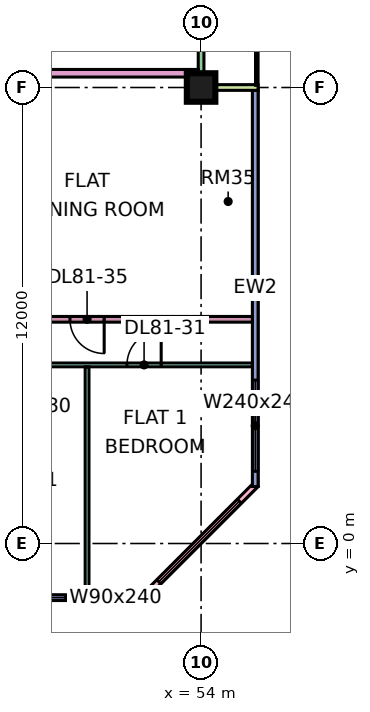
"""IFC4 building model, lengths in metres.
Left out: names, types, materials, properties, quantities, classifications, styles, units other than length and angle.
Written with IfcOpenShell. Run it as: python <this file> out.ifc"""

import sys

from ifc_helpers import new_model, si_unit, direction, frame, frame_2d, origin, origin_2d, place, context, subcontext, project, spatial, rectangle, extrude, element, fill, save


model = new_model("IFC4")
c1 = context("Model", 3, precision=1e-05, world=origin(), true_north=direction((0.0, 1.0)))
c2 = subcontext(c1, "Body", "Model", "MODEL_VIEW")
j1 = project(units=[si_unit("LENGTHUNIT", "METRE"), si_unit("PLANEANGLEUNIT", "RADIAN")], contexts=[c1])
p1 = place(None, origin())
s1 = spatial("IfcSite", under=j1, at=p1, CompositionType="ELEMENT")
p2 = place(p1, origin())
s2 = spatial("IfcBuilding", under=s1, at=p2, CompositionType="ELEMENT")
p3 = place(p2, frame((0.0, 0.0, 350.15)))
s3 = spatial("IfcBuildingStorey", under=s2, at=p3, CompositionType="ELEMENT", Elevation=350.15)
p4 = place(p3, frame((54.0, 12.0, 0.0), z_axis=(0.0, 0.0, 1.0), x_axis=(1.0, 0.0, 0.0)))
e1 = element("IfcColumn", 1, at=p4, inside=s3, PredefinedType="COLUMN", context=c2, shape_type="SweptSolid", body=[
    extrude(rectangle(XDim=0.75, YDim=0.75, at=origin_2d()), origin(), (0.0, 0.0, 1.0), 3.75),
])
p5 = place(p3, frame((48.075, -1.425, 0.0), z_axis=(0.0, 0.0, 1.0), x_axis=(1.0, 0.0, 0.0)))
e2 = element("IfcWall", 2, at=p5, inside=s3, PredefinedType="SOLIDWALL", context=c2, shape_type="SweptSolid", body=[
    extrude(rectangle(XDim=4.425, YDim=0.15, at=frame_2d((2.212, 0.0))), origin(), (0.0, 0.0, 1.0), 3.35),
])
p6 = place(p5, frame((0.562, 0.0, 0.45)))
e3 = element("IfcOpeningElement", 3, at=p6, cuts=e2, PredefinedType="OPENING", context=c2, shape_type="SweptSolid", body=[
    extrude(rectangle(XDim=1.8, YDim=2.4, at=frame_2d((0.9, 1.2))), frame((0.0, 0.085, 0.0), z_axis=(0.0, -1.0, 0.0), x_axis=(1.0, 0.0, 0.0)), (0.0, 0.0, 1.0), 0.17),
])
p7 = place(p5, frame((3.225, 0.0, 0.45)))
e4 = element("IfcOpeningElement", 4, at=p7, cuts=e2, PredefinedType="OPENING", context=c2, shape_type="SweptSolid", body=[
    extrude(rectangle(XDim=0.9, YDim=2.4, at=frame_2d((0.45, 1.2))), frame((0.0, 0.085, 0.0), z_axis=(0.0, -1.0, 0.0), x_axis=(1.0, 0.0, 0.0)), (0.0, 0.0, 1.0), 0.17),
])
p8 = place(p3, frame((52.447, -1.447, 0.0), z_axis=(0.0, 0.0, 1.0), x_axis=(0.707106781187, 0.707106781187, 0.0)))
e5 = element("IfcWall", 5, at=p8, inside=s3, PredefinedType="SOLIDWALL", context=c2, shape_type="SweptSolid", body=[
    extrude(rectangle(XDim=4.243, YDim=0.15, at=frame_2d((2.121, 0.0))), origin(), (0.0, 0.0, 1.0), 3.35),
])
p9 = place(p8, frame((0.621, 0.0, 0.45)))
e6 = element("IfcOpeningElement", 6, at=p9, cuts=e5, PredefinedType="OPENING", context=c2, shape_type="SweptSolid", body=[
    extrude(rectangle(XDim=3.0, YDim=2.4, at=frame_2d((1.5, 1.2))), frame((0.0, 0.085, 0.0), z_axis=(0.0, -1.0, 0.0), x_axis=(1.0, 0.0, 0.0)), (0.0, 0.0, 1.0), 0.17),
])
p10 = place(p3, frame((55.425, 1.5, 0.0), z_axis=(0.0, 0.0, 1.0), x_axis=(0.0, 1.0, 0.0)))
e7 = element("IfcWall", 7, at=p10, inside=s3, PredefinedType="SOLIDWALL", context=c2, shape_type="SweptSolid", body=[
    extrude(rectangle(XDim=10.425, YDim=0.15, at=frame_2d((5.212, 0.0))), origin(), (0.0, 0.0, 1.0), 3.35),
])
p11 = place(p10, frame((0.4, 0.0, 0.45)))
e8 = element("IfcOpeningElement", 8, at=p11, cuts=e7, PredefinedType="OPENING", context=c2, shape_type="SweptSolid", body=[
    extrude(rectangle(XDim=2.4, YDim=2.4, at=frame_2d((1.2, 1.2))), frame((0.0, 0.085, 0.0), z_axis=(0.0, -1.0, 0.0), x_axis=(1.0, 0.0, 0.0)), (0.0, 0.0, 1.0), 0.17),
])
p12 = place(p3, frame((54.0, 12.075, 0.0), z_axis=(0.0, 0.0, 1.0), x_axis=(0.0, 1.0, 0.0)))
e9 = element("IfcWall", 9, at=p12, inside=s3, PredefinedType="SOLIDWALL", context=c2, shape_type="SweptSolid", body=[
    extrude(rectangle(XDim=10.35, YDim=0.15, at=frame_2d((5.175, 0.0))), origin(), (0.0, 0.0, 1.0), 3.35),
])
p13 = place(p12, frame((4.538, 0.0, 0.45)))
e10 = element("IfcOpeningElement", 10, at=p13, cuts=e9, PredefinedType="OPENING", context=c2, shape_type="SweptSolid", body=[
    extrude(rectangle(XDim=4.8, YDim=2.4, at=frame_2d((2.4, 1.2))), frame((0.0, 0.085, 0.0), z_axis=(0.0, -1.0, 0.0), x_axis=(1.0, 0.0, 0.0)), (0.0, 0.0, 1.0), 0.17),
])
p14 = place(p3, frame((55.5, 12.0, 0.0), z_axis=(0.0, 0.0, 1.0), x_axis=(-1.0, 0.0, 0.0)))
e11 = element("IfcWall", 11, at=p14, inside=s3, PredefinedType="SOLIDWALL", context=c2, shape_type="SweptSolid", body=[
    extrude(rectangle(XDim=1.5, YDim=0.15, at=frame_2d((0.75, 0.0))), origin(), (0.0, 0.0, 1.0), 3.35),
])
p15 = place(p3, frame((33.05, 4.7, 0.0), z_axis=(0.0, 0.0, 1.0), x_axis=(1.0, 0.0, 0.0)))
e12 = element("IfcWall", 12, at=p15, inside=s3, PredefinedType="PARTITIONING", context=c2, shape_type="SweptSolid", body=[
    extrude(rectangle(XDim=22.301, YDim=0.1, at=frame_2d((11.15, 0.0))), origin(), (0.0, 0.0, 1.0), 3.35),
])
p16 = place(p15, frame((1.0, 0.0, 0.0)))
e13 = element("IfcOpeningElement", 13, at=p16, cuts=e12, PredefinedType="OPENING", context=c2, shape_type="SweptSolid", body=[
    extrude(rectangle(XDim=0.9, YDim=2.1, at=frame_2d((0.45, 1.05))), frame((0.0, 0.06, 0.0), z_axis=(0.0, -1.0, 0.0), x_axis=(1.0, 0.0, 0.0)), (0.0, 0.0, 1.0), 0.12),
])
p17 = place(p15, frame((13.0, 0.0, 0.0)))
e14 = element("IfcOpeningElement", 14, at=p17, cuts=e12, PredefinedType="OPENING", context=c2, shape_type="SweptSolid", body=[
    extrude(rectangle(XDim=0.9, YDim=2.1, at=frame_2d((0.45, 1.05))), frame((0.0, 0.06, 0.0), z_axis=(0.0, -1.0, 0.0), x_axis=(1.0, 0.0, 0.0)), (0.0, 0.0, 1.0), 0.12),
])
p18 = place(p15, frame((16.0, 0.0, 0.0)))
e15 = element("IfcOpeningElement", 15, at=p18, cuts=e12, PredefinedType="OPENING", context=c2, shape_type="SweptSolid", body=[
    extrude(rectangle(XDim=0.9, YDim=2.1, at=frame_2d((0.45, 1.05))), frame((0.0, 0.06, 0.0), z_axis=(0.0, -1.0, 0.0), x_axis=(1.0, 0.0, 0.0)), (0.0, 0.0, 1.0), 0.12),
])
p19 = place(p15, frame((19.0, 0.0, 0.0)))
e16 = element("IfcOpeningElement", 16, at=p19, cuts=e12, PredefinedType="OPENING", context=c2, shape_type="SweptSolid", body=[
    extrude(rectangle(XDim=0.9, YDim=2.1, at=frame_2d((0.45, 1.05))), frame((0.0, 0.06, 0.0), z_axis=(0.0, -1.0, 0.0), x_axis=(1.0, 0.0, 0.0)), (0.0, 0.0, 1.0), 0.12),
])
p20 = place(p15, frame((7.0, 0.0, 0.0)))
e17 = element("IfcOpeningElement", 17, at=p20, cuts=e12, PredefinedType="OPENING", context=c2, shape_type="SweptSolid", body=[
    extrude(rectangle(XDim=0.9, YDim=2.1, at=frame_2d((0.45, 1.05))), frame((0.0, 0.06, 0.0), z_axis=(0.0, -1.0, 0.0), x_axis=(1.0, 0.0, 0.0)), (0.0, 0.0, 1.0), 0.12),
])
p21 = place(p3, frame((40.65, 12.375, 0.0), z_axis=(0.0, 0.0, 1.0), x_axis=(1.0, 0.0, 0.0)))
e18 = element("IfcWall", 18, at=p21, inside=s3, PredefinedType="PARTITIONING", context=c2, shape_type="SweptSolid", body=[
    extrude(rectangle(XDim=13.276, YDim=0.2, at=frame_2d((6.638, 0.0))), origin(), (0.0, 0.0, 1.0), 3.35),
])
p22 = place(p21, frame((1.05, 0.0, 0.0)))
e19 = element("IfcOpeningElement", 19, at=p22, cuts=e18, PredefinedType="OPENING", context=c2, shape_type="SweptSolid", body=[
    extrude(rectangle(XDim=1.0, YDim=2.1, at=frame_2d((0.5, 1.05))), frame((0.0, 0.11, 0.0), z_axis=(0.0, -1.0, 0.0), x_axis=(1.0, 0.0, 0.0)), (0.0, 0.0, 1.0), 0.22),
])
p23 = place(p3, frame((43.575, 5.9, 0.0), z_axis=(0.0, 0.0, 1.0), x_axis=(1.0, 0.0, 0.0)))
e20 = element("IfcWall", 20, at=p23, inside=s3, PredefinedType="PARTITIONING", context=c2, shape_type="SweptSolid", body=[
    extrude(rectangle(XDim=11.775, YDim=0.15, at=frame_2d((5.888, 0.0))), origin(), (0.0, 0.0, 1.0), 3.35),
])
p24 = place(p23, frame((1.825, 0.0, 0.0)))
e21 = element("IfcOpeningElement", 21, at=p24, cuts=e20, PredefinedType="OPENING", context=c2, shape_type="SweptSolid", body=[
    extrude(rectangle(XDim=0.8, YDim=2.1, at=frame_2d((0.4, 1.05))), frame((0.0, 0.085, 0.0), z_axis=(0.0, -1.0, 0.0), x_axis=(1.0, 0.0, 0.0)), (0.0, 0.0, 1.0), 0.17),
])
p25 = place(p23, frame((6.975, 0.0, 0.0)))
e22 = element("IfcOpeningElement", 22, at=p25, cuts=e20, PredefinedType="OPENING", context=c2, shape_type="SweptSolid", body=[
    extrude(rectangle(XDim=0.9, YDim=2.1, at=frame_2d((0.45, 1.05))), frame((0.0, 0.085, 0.0), z_axis=(0.0, -1.0, 0.0), x_axis=(1.0, 0.0, 0.0)), (0.0, 0.0, 1.0), 0.17),
])
p26 = place(p3, frame((51.0, -1.351, 0.0), z_axis=(0.0, 0.0, 1.0), x_axis=(0.0, 1.0, 0.0)))
e23 = element("IfcWall", 23, at=p26, inside=s3, PredefinedType="PARTITIONING", context=c2, shape_type="SweptSolid", body=[
    extrude(rectangle(XDim=6.001, YDim=0.1, at=frame_2d((3.0, 0.0))), origin(), (0.0, 0.0, 1.0), 3.35),
])
p27 = place(p6, origin())
e24 = element("IfcWindow", 24, at=p27, inside=s3, PartitioningType="SINGLE_PANEL", PredefinedType="WINDOW", context=c2, shape_type="SweptSolid", body=[
    extrude(rectangle(XDim=1.8, YDim=2.4, at=frame_2d((0.9, 1.2))), frame((0.0, 0.03, 0.0), z_axis=(0.0, -1.0, 0.0), x_axis=(1.0, 0.0, 0.0)), (0.0, 0.0, 1.0), 0.06),
])
fill(e3, e24)
p28 = place(p7, origin())
e25 = element("IfcWindow", 25, at=p28, inside=s3, PartitioningType="SINGLE_PANEL", PredefinedType="WINDOW", context=c2, shape_type="SweptSolid", body=[
    extrude(rectangle(XDim=0.9, YDim=2.4, at=frame_2d((0.45, 1.2))), frame((0.0, 0.03, 0.0), z_axis=(0.0, -1.0, 0.0), x_axis=(1.0, 0.0, 0.0)), (0.0, 0.0, 1.0), 0.06),
])
fill(e4, e25)
p29 = place(p9, origin())
e26 = element("IfcWindow", 26, at=p29, inside=s3, PartitioningType="SINGLE_PANEL", PredefinedType="WINDOW", context=c2, shape_type="SweptSolid", body=[
    extrude(rectangle(XDim=3.0, YDim=2.4, at=frame_2d((1.5, 1.2))), frame((0.0, 0.03, 0.0), z_axis=(0.0, -1.0, 0.0), x_axis=(1.0, 0.0, 0.0)), (0.0, 0.0, 1.0), 0.06),
])
fill(e6, e26)
p30 = place(p11, origin())
e27 = element("IfcWindow", 27, at=p30, inside=s3, PartitioningType="SINGLE_PANEL", PredefinedType="WINDOW", context=c2, shape_type="SweptSolid", body=[
    extrude(rectangle(XDim=2.4, YDim=2.4, at=frame_2d((1.2, 1.2))), frame((0.0, 0.03, 0.0), z_axis=(0.0, -1.0, 0.0), x_axis=(1.0, 0.0, 0.0)), (0.0, 0.0, 1.0), 0.06),
])
fill(e8, e27)
p31 = place(p19, frame((0.9, 0.0, 0.0), z_axis=(0.0, 0.0, 1.0), x_axis=(-1.0, 0.0, 0.0)))
e28 = element("IfcDoor", 28, at=p31, inside=s3, OperationType="SINGLE_SWING_RIGHT", PredefinedType="DOOR", context=c2, shape_type="SweptSolid", body=[
    extrude(rectangle(XDim=0.9, YDim=2.1, at=frame_2d((0.45, 1.05))), frame((0.0, 0.025, 0.0), z_axis=(0.0, -1.0, 0.0), x_axis=(1.0, 0.0, 0.0)), (0.0, 0.0, 1.0), 0.05),
])
fill(e16, e28)
p32 = place(p25, origin())
e29 = element("IfcDoor", 29, at=p32, inside=s3, OperationType="SINGLE_SWING_RIGHT", PredefinedType="DOOR", context=c2, shape_type="SweptSolid", body=[
    extrude(rectangle(XDim=0.9, YDim=2.1, at=frame_2d((0.45, 1.05))), frame((0.0, 0.025, 0.0), z_axis=(0.0, -1.0, 0.0), x_axis=(1.0, 0.0, 0.0)), (0.0, 0.0, 1.0), 0.05),
])
fill(e22, e29)
save(model, sys.argv[1])
